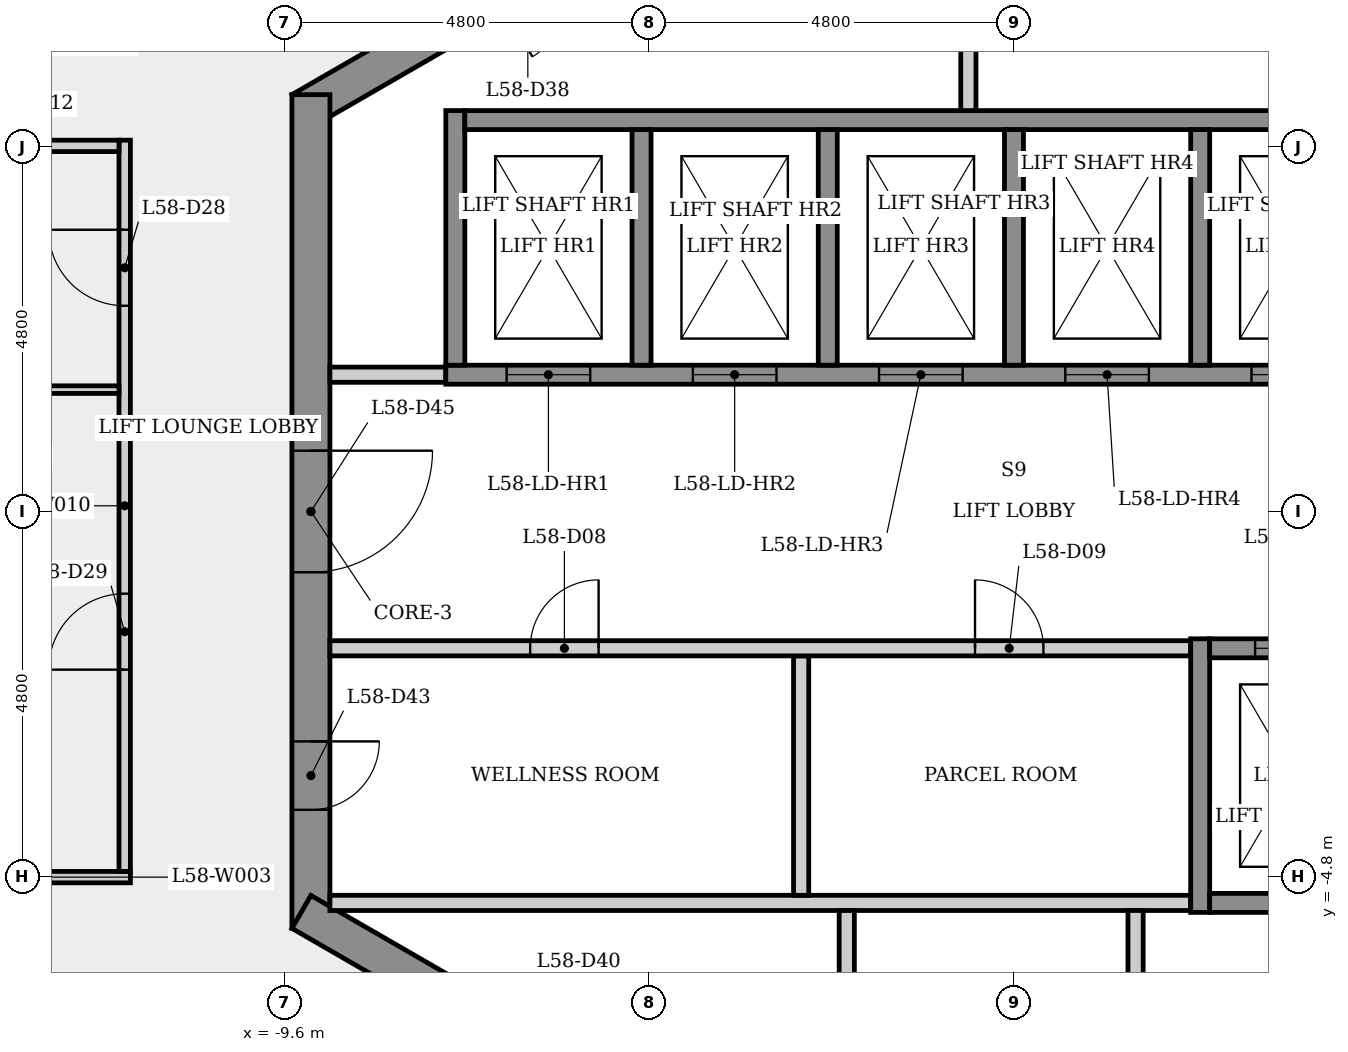
"""IFC4 building model, lengths in metres.
Left out: names, types, materials, properties, quantities, classifications, styles, units other than length and angle.
Written with IfcOpenShell. Run it as: python <this file> out.ifc"""

import sys

from ifc_helpers import new_model, si_unit, direction, frame, frame_2d, origin, place, context, subcontext, project, spatial, rectangle, extrude, element, fill, save


model = new_model("IFC4")
c1 = context("Model", 3, precision=1e-05, world=origin(), true_north=direction((0.0, 1.0)))
c2 = subcontext(c1, "Body", "Model", "MODEL_VIEW")
j1 = project(units=[si_unit("LENGTHUNIT", "METRE"), si_unit("PLANEANGLEUNIT", "RADIAN")], contexts=[c1])
p1 = place(None, origin())
s1 = spatial("IfcSite", under=j1, at=p1, CompositionType="ELEMENT")
p2 = place(p1, origin())
s2 = spatial("IfcBuilding", under=s1, at=p2, CompositionType="ELEMENT")
p3 = place(p2, frame((0.0, 0.0, 218.9)))
s3 = spatial("IfcBuildingStorey", under=s2, at=p3, CompositionType="ELEMENT", Elevation=218.9)
p4 = place(p3, frame((9.375, 5.268, 0.0), z_axis=(0.0, 0.0, 1.0), x_axis=(-0.866023993627, 0.500002442456, 0.0)))
e1 = element("IfcWall", 1, at=p4, inside=s3, PredefinedType="SHEAR", context=c2, shape_type="SweptSolid", body=[
    extrude(rectangle(XDim=10.97, YDim=0.5, at=frame_2d((5.485, 0.0))), origin(), (0.0, 0.0, 1.0), 3.4),
])
p5 = place(p4, frame((5.382, 0.0, 0.0)))
e2 = element("IfcOpeningElement", 2, at=p5, cuts=e1, PredefinedType="OPENING", context=c2, shape_type="SweptSolid", body=[
    extrude(rectangle(XDim=0.9, YDim=2.1, at=frame_2d((0.45, 1.05))), frame((0.0, 0.26, 0.0), z_axis=(0.0, -1.0, 0.0), x_axis=(1.0, 0.0, 0.0)), (0.0, 0.0, 1.0), 0.52),
])
p6 = place(p3, frame((0.125, 10.753, 0.0), z_axis=(0.0, 0.0, 1.0), x_axis=(-0.866023993627, -0.500002442456, 0.0)))
e3 = element("IfcWall", 3, at=p6, inside=s3, PredefinedType="SHEAR", context=c2, shape_type="SweptSolid", body=[
    extrude(rectangle(XDim=10.97, YDim=0.5, at=frame_2d((5.485, 0.0))), origin(), (0.0, 0.0, 1.0), 3.4),
])
p7 = place(p6, frame((7.08, 0.0, 0.0)))
e4 = element("IfcOpeningElement", 4, at=p7, cuts=e3, PredefinedType="OPENING", context=c2, shape_type="SweptSolid", body=[
    extrude(rectangle(XDim=0.9, YDim=2.1, at=frame_2d((0.45, 1.05))), frame((0.0, 0.26, 0.0), z_axis=(0.0, -1.0, 0.0), x_axis=(1.0, 0.0, 0.0)), (0.0, 0.0, 1.0), 0.52),
])
p8 = place(p3, frame((-9.25, 5.485, 0.0), z_axis=(0.0, 0.0, 1.0), x_axis=(0.0, -1.0, 0.0)))
e5 = element("IfcWall", 5, at=p8, inside=s3, PredefinedType="SHEAR", context=c2, shape_type="SweptSolid", body=[
    extrude(rectangle(XDim=10.97, YDim=0.5, at=frame_2d((5.485, 0.0))), origin(), (0.0, 0.0, 1.0), 3.4),
])
p9 = place(p8, frame((8.51, 0.0, 0.0)))
e6 = element("IfcOpeningElement", 6, at=p9, cuts=e5, PredefinedType="OPENING", context=c2, shape_type="SweptSolid", body=[
    extrude(rectangle(XDim=0.9, YDim=2.1, at=frame_2d((0.45, 1.05))), frame((0.0, 0.26, 0.0), z_axis=(0.0, -1.0, 0.0), x_axis=(1.0, 0.0, 0.0)), (0.0, 0.0, 1.0), 0.52),
])
p10 = place(p8, frame((4.685, 0.0, 0.0)))
e7 = element("IfcOpeningElement", 7, at=p10, cuts=e5, PredefinedType="OPENING", context=c2, shape_type="SweptSolid", body=[
    extrude(rectangle(XDim=1.6, YDim=2.1, at=frame_2d((0.8, 1.05))), frame((0.0, 0.26, 0.0), z_axis=(0.0, -1.0, 0.0), x_axis=(1.0, 0.0, 0.0)), (0.0, 0.0, 1.0), 0.52),
])
p11 = place(p3, frame((-9.375, -5.268, 0.0), z_axis=(0.0, 0.0, 1.0), x_axis=(0.866023993627, -0.500002442456, 0.0)))
e8 = element("IfcWall", 8, at=p11, inside=s3, PredefinedType="SHEAR", context=c2, shape_type="SweptSolid", body=[
    extrude(rectangle(XDim=10.97, YDim=0.5, at=frame_2d((5.485, 0.0))), origin(), (0.0, 0.0, 1.0), 3.4),
])
p12 = place(p11, frame((3.765, 0.0, 0.0)))
e9 = element("IfcOpeningElement", 9, at=p12, cuts=e8, PredefinedType="OPENING", context=c2, shape_type="SweptSolid", body=[
    extrude(rectangle(XDim=0.9, YDim=2.1, at=frame_2d((0.45, 1.05))), frame((0.0, 0.26, 0.0), z_axis=(0.0, -1.0, 0.0), x_axis=(1.0, 0.0, 0.0)), (0.0, 0.0, 1.0), 0.52),
])
p13 = place(p11, frame((8.96, 0.0, 0.0)))
e10 = element("IfcOpeningElement", 10, at=p13, cuts=e8, PredefinedType="OPENING", context=c2, shape_type="SweptSolid", body=[
    extrude(rectangle(XDim=0.9, YDim=2.1, at=frame_2d((0.45, 1.05))), frame((0.0, 0.26, 0.0), z_axis=(0.0, -1.0, 0.0), x_axis=(1.0, 0.0, 0.0)), (0.0, 0.0, 1.0), 0.52),
])
p14 = place(p3, frame((-0.125, -10.753, 0.0), z_axis=(0.0, 0.0, 1.0), x_axis=(0.866023993627, 0.500002442456, 0.0)))
e11 = element("IfcWall", 11, at=p14, inside=s3, PredefinedType="SHEAR", context=c2, shape_type="SweptSolid", body=[
    extrude(rectangle(XDim=10.97, YDim=0.5, at=frame_2d((5.485, 0.0))), origin(), (0.0, 0.0, 1.0), 3.4),
])
p15 = place(p14, frame((7.657, 0.0, 0.0)))
e12 = element("IfcOpeningElement", 12, at=p15, cuts=e11, PredefinedType="OPENING", context=c2, shape_type="SweptSolid", body=[
    extrude(rectangle(XDim=0.9, YDim=2.1, at=frame_2d((0.45, 1.05))), frame((0.0, 0.26, 0.0), z_axis=(0.0, -1.0, 0.0), x_axis=(1.0, 0.0, 0.0)), (0.0, 0.0, 1.0), 0.52),
])
p16 = place(p3, frame((-14.391, 4.746, 0.0), z_axis=(0.0, 0.0, 1.0), x_axis=(0.500023814363, 0.866011654119, 0.0)))
e13 = element("IfcWall", 13, at=p16, inside=s3, PredefinedType="PARTITIONING", context=c2, shape_type="SweptSolid", body=[
    extrude(rectangle(XDim=6.171, YDim=0.15, at=frame_2d((3.085, 0.0))), origin(), (0.0, 0.0, 1.0), 3.05),
])
p17 = place(p16, frame((2.585, 0.0, 0.0)))
e14 = element("IfcOpeningElement", 14, at=p17, cuts=e13, PredefinedType="OPENING", context=c2, shape_type="SweptSolid", body=[
    extrude(rectangle(XDim=1.0, YDim=2.1, at=frame_2d((0.5, 1.05))), frame((0.0, 0.085, 0.0), z_axis=(0.0, -1.0, 0.0), x_axis=(1.0, 0.0, 0.0)), (0.0, 0.0, 1.0), 0.17),
])
p18 = place(p3, frame((-14.428, -4.811, 0.0), z_axis=(0.0, 0.0, 1.0), x_axis=(1.0, 0.0, 0.0)))
e15 = element("IfcWall", 15, at=p18, inside=s3, PredefinedType="PARTITIONING", context=c2, shape_type="SweptSolid", body=[
    extrude(rectangle(XDim=2.803, YDim=0.15, at=frame_2d((1.402, 0.0))), origin(), (0.0, 0.0, 1.0), 3.05),
])
p19 = place(p3, frame((-11.7, -4.736, 0.0), z_axis=(0.0, 0.0, 1.0), x_axis=(0.0, 1.0, 0.0)))
e16 = element("IfcWall", 16, at=p19, inside=s3, PredefinedType="PARTITIONING", context=c2, shape_type="SweptSolid", body=[
    extrude(rectangle(XDim=9.622, YDim=0.15, at=frame_2d((4.811, 0.0))), origin(), (0.0, 0.0, 1.0), 3.05),
])
p20 = place(p19, frame((7.443, 0.0, 0.0)))
e17 = element("IfcOpeningElement", 17, at=p20, cuts=e16, PredefinedType="OPENING", context=c2, shape_type="SweptSolid", body=[
    extrude(rectangle(XDim=1.0, YDim=2.1, at=frame_2d((0.5, 1.05))), frame((0.0, 0.085, 0.0), z_axis=(0.0, -1.0, 0.0), x_axis=(1.0, 0.0, 0.0)), (0.0, 0.0, 1.0), 0.17),
])
p21 = place(p19, frame((2.655, 0.0, 0.0)))
e18 = element("IfcOpeningElement", 18, at=p21, cuts=e16, PredefinedType="OPENING", context=c2, shape_type="SweptSolid", body=[
    extrude(rectangle(XDim=1.0, YDim=2.1, at=frame_2d((0.5, 1.05))), frame((0.0, 0.085, 0.0), z_axis=(0.0, -1.0, 0.0), x_axis=(1.0, 0.0, 0.0)), (0.0, 0.0, 1.0), 0.17),
])
p22 = place(p3, frame((-11.775, 1.604, 0.0), z_axis=(0.0, 0.0, 1.0), x_axis=(-1.0, 0.0, 0.0)))
e19 = element("IfcWall", 19, at=p22, inside=s3, PredefinedType="PARTITIONING", context=c2, shape_type="SweptSolid", body=[
    extrude(rectangle(XDim=5.113, YDim=0.1, at=frame_2d((2.556, 0.0))), origin(), (0.0, 0.0, 1.0), 3.05),
])
p23 = place(p3, frame((-11.775, 4.811, 0.0), z_axis=(0.0, 0.0, 1.0), x_axis=(-1.0, 0.0, 0.0)))
e20 = element("IfcWall", 20, at=p23, inside=s3, PredefinedType="PARTITIONING", context=c2, shape_type="SweptSolid", body=[
    extrude(rectangle(XDim=2.504, YDim=0.15, at=frame_2d((1.252, 0.0))), origin(), (0.0, 0.0, 1.0), 3.05),
])
p24 = place(p3, frame((-9.0, 1.8, 0.0), z_axis=(0.0, 0.0, 1.0), x_axis=(1.0, 0.0, 0.0)))
e21 = element("IfcWall", 21, at=p24, inside=s3, PredefinedType="PARTITIONING", context=c2, shape_type="SweptSolid", body=[
    extrude(rectangle(XDim=1.525, YDim=0.2, at=frame_2d((0.763, 0.0))), origin(), (0.0, 0.0, 1.0), 3.05),
])
p25 = place(p3, frame((-9.0, -5.15, 0.0), z_axis=(0.0, 0.0, 1.0), x_axis=(1.0, 0.0, 0.0)))
e22 = element("IfcWall", 22, at=p25, inside=s3, PredefinedType="PARTITIONING", context=c2, shape_type="SweptSolid", body=[
    extrude(rectangle(XDim=11.325, YDim=0.2, at=frame_2d((5.663, 0.0))), origin(), (0.0, 0.0, 1.0), 3.05),
])
p26 = place(p3, frame((-7.475, 1.8, 0.0), z_axis=(0.0, 0.0, 1.0), x_axis=(1.0, 0.0, 0.0)))
e23 = element("IfcWall", 23, at=p26, inside=s3, PredefinedType="SHEAR", context=c2, shape_type="SweptSolid", body=[
    extrude(rectangle(XDim=14.95, YDim=0.25, at=frame_2d((7.475, 0.0))), origin(), (0.0, 0.0, 1.0), 3.05),
])
p27 = place(p26, frame((0.8, 0.0, 0.0)))
e24 = element("IfcOpeningElement", 24, at=p27, cuts=e23, PredefinedType="OPENING", context=c2, shape_type="SweptSolid", body=[
    extrude(rectangle(XDim=1.1, YDim=2.1, at=frame_2d((0.55, 1.05))), frame((0.0, 0.135, 0.0), z_axis=(0.0, -1.0, 0.0), x_axis=(1.0, 0.0, 0.0)), (0.0, 0.0, 1.0), 0.27),
])
p28 = place(p26, frame((3.25, 0.0, 0.0)))
e25 = element("IfcOpeningElement", 25, at=p28, cuts=e23, PredefinedType="OPENING", context=c2, shape_type="SweptSolid", body=[
    extrude(rectangle(XDim=1.1, YDim=2.1, at=frame_2d((0.55, 1.05))), frame((0.0, 0.135, 0.0), z_axis=(0.0, -1.0, 0.0), x_axis=(1.0, 0.0, 0.0)), (0.0, 0.0, 1.0), 0.27),
])
p29 = place(p26, frame((5.7, 0.0, 0.0)))
e26 = element("IfcOpeningElement", 26, at=p29, cuts=e23, PredefinedType="OPENING", context=c2, shape_type="SweptSolid", body=[
    extrude(rectangle(XDim=1.1, YDim=2.1, at=frame_2d((0.55, 1.05))), frame((0.0, 0.135, 0.0), z_axis=(0.0, -1.0, 0.0), x_axis=(1.0, 0.0, 0.0)), (0.0, 0.0, 1.0), 0.27),
])
p30 = place(p26, frame((8.15, 0.0, 0.0)))
e27 = element("IfcOpeningElement", 27, at=p30, cuts=e23, PredefinedType="OPENING", context=c2, shape_type="SweptSolid", body=[
    extrude(rectangle(XDim=1.1, YDim=2.1, at=frame_2d((0.55, 1.05))), frame((0.0, 0.135, 0.0), z_axis=(0.0, -1.0, 0.0), x_axis=(1.0, 0.0, 0.0)), (0.0, 0.0, 1.0), 0.27),
])
p31 = place(p26, frame((10.6, 0.0, 0.0)))
e28 = element("IfcOpeningElement", 28, at=p31, cuts=e23, PredefinedType="OPENING", context=c2, shape_type="SweptSolid", body=[
    extrude(rectangle(XDim=1.1, YDim=2.1, at=frame_2d((0.55, 1.05))), frame((0.0, 0.135, 0.0), z_axis=(0.0, -1.0, 0.0), x_axis=(1.0, 0.0, 0.0)), (0.0, 0.0, 1.0), 0.27),
])
p32 = place(p26, frame((13.05, 0.0, 0.0)))
e29 = element("IfcOpeningElement", 29, at=p32, cuts=e23, PredefinedType="OPENING", context=c2, shape_type="SweptSolid", body=[
    extrude(rectangle(XDim=1.1, YDim=2.1, at=frame_2d((0.55, 1.05))), frame((0.0, 0.135, 0.0), z_axis=(0.0, -1.0, 0.0), x_axis=(1.0, 0.0, 0.0)), (0.0, 0.0, 1.0), 0.27),
])
p33 = place(p3, frame((-7.35, 1.925, 0.0), z_axis=(0.0, 0.0, 1.0), x_axis=(0.0, 1.0, 0.0)))
e30 = element("IfcWall", 30, at=p33, inside=s3, PredefinedType="SHEAR", context=c2, shape_type="SweptSolid", body=[
    extrude(rectangle(XDim=3.35, YDim=0.25, at=frame_2d((1.675, 0.0))), origin(), (0.0, 0.0, 1.0), 3.05),
])
p34 = place(p3, frame((-7.225, 5.15, 0.0), z_axis=(0.0, 0.0, 1.0), x_axis=(1.0, 0.0, 0.0)))
e31 = element("IfcWall", 31, at=p34, inside=s3, PredefinedType="SHEAR", context=c2, shape_type="SweptSolid", body=[
    extrude(rectangle(XDim=14.7, YDim=0.25, at=frame_2d((7.35, 0.0))), origin(), (0.0, 0.0, 1.0), 3.05),
])
p35 = place(p3, frame((-4.9, 5.025, 0.0), z_axis=(0.0, 0.0, 1.0), x_axis=(0.0, -1.0, 0.0)))
e32 = element("IfcWall", 32, at=p35, inside=s3, PredefinedType="SHEAR", context=c2, shape_type="SweptSolid", body=[
    extrude(rectangle(XDim=3.1, YDim=0.25, at=frame_2d((1.55, 0.0))), origin(), (0.0, 0.0, 1.0), 3.4),
])
p36 = place(p3, frame((-2.8, -1.9, 0.0), z_axis=(0.0, 0.0, 1.0), x_axis=(0.0, -1.0, 0.0)))
e33 = element("IfcWall", 33, at=p36, inside=s3, PredefinedType="PARTITIONING", context=c2, shape_type="SweptSolid", body=[
    extrude(rectangle(XDim=3.15, YDim=0.2, at=frame_2d((1.575, 0.0))), origin(), (0.0, 0.0, 1.0), 3.05),
])
p37 = place(p3, frame((-9.0, -1.8, 0.0), z_axis=(0.0, 0.0, 1.0), x_axis=(1.0, 0.0, 0.0)))
e34 = element("IfcWall", 34, at=p37, inside=s3, PredefinedType="PARTITIONING", context=c2, shape_type="SweptSolid", body=[
    extrude(rectangle(XDim=11.325, YDim=0.2, at=frame_2d((5.663, 0.0))), origin(), (0.0, 0.0, 1.0), 3.05),
])
p38 = place(p37, frame((2.635, 0.0, 0.0)))
e35 = element("IfcOpeningElement", 35, at=p38, cuts=e34, PredefinedType="OPENING", context=c2, shape_type="SweptSolid", body=[
    extrude(rectangle(XDim=0.9, YDim=2.1, at=frame_2d((0.45, 1.05))), frame((0.0, 0.11, 0.0), z_axis=(0.0, -1.0, 0.0), x_axis=(1.0, 0.0, 0.0)), (0.0, 0.0, 1.0), 0.22),
])
p39 = place(p37, frame((8.488, 0.0, 0.0)))
e36 = element("IfcOpeningElement", 36, at=p39, cuts=e34, PredefinedType="OPENING", context=c2, shape_type="SweptSolid", body=[
    extrude(rectangle(XDim=0.9, YDim=2.1, at=frame_2d((0.45, 1.05))), frame((0.0, 0.11, 0.0), z_axis=(0.0, -1.0, 0.0), x_axis=(1.0, 0.0, 0.0)), (0.0, 0.0, 1.0), 0.22),
])
p40 = place(p3, frame((-2.45, 5.025, 0.0), z_axis=(0.0, 0.0, 1.0), x_axis=(0.0, -1.0, 0.0)))
e37 = element("IfcWall", 37, at=p40, inside=s3, PredefinedType="SHEAR", context=c2, shape_type="SweptSolid", body=[
    extrude(rectangle(XDim=3.1, YDim=0.25, at=frame_2d((1.55, 0.0))), origin(), (0.0, 0.0, 1.0), 3.4),
])
p41 = place(p3, frame((-2.2, -5.25, 0.0), z_axis=(0.0, 0.0, 1.0), x_axis=(0.0, -1.0, 0.0)))
e38 = element("IfcWall", 38, at=p41, inside=s3, PredefinedType="PARTITIONING", context=c2, shape_type="SweptSolid", body=[
    extrude(rectangle(XDim=3.872, YDim=0.2, at=frame_2d((1.936, 0.0))), origin(), (0.0, 0.0, 1.0), 3.05),
])
p42 = place(p3, frame((-0.6, 10.046, 0.0), z_axis=(0.0, 0.0, 1.0), x_axis=(0.0, -1.0, 0.0)))
e39 = element("IfcWall", 39, at=p42, inside=s3, PredefinedType="PARTITIONING", context=c2, shape_type="SweptSolid", body=[
    extrude(rectangle(XDim=4.771, YDim=0.2, at=frame_2d((2.385, 0.0))), origin(), (0.0, 0.0, 1.0), 3.05),
])
p43 = place(p3, frame((0.0, 5.025, 0.0), z_axis=(0.0, 0.0, 1.0), x_axis=(0.0, -1.0, 0.0)))
e40 = element("IfcWall", 40, at=p43, inside=s3, PredefinedType="SHEAR", context=c2, shape_type="SweptSolid", body=[
    extrude(rectangle(XDim=3.1, YDim=0.25, at=frame_2d((1.55, 0.0))), origin(), (0.0, 0.0, 1.0), 3.4),
])
p44 = place(p3, frame((1.6, -5.25, 0.0), z_axis=(0.0, 0.0, 1.0), x_axis=(0.0, -1.0, 0.0)))
e41 = element("IfcWall", 41, at=p44, inside=s3, PredefinedType="PARTITIONING", context=c2, shape_type="SweptSolid", body=[
    extrude(rectangle(XDim=4.219, YDim=0.2, at=frame_2d((2.109, 0.0))), origin(), (0.0, 0.0, 1.0), 3.05),
])
p45 = place(p3, frame((2.45, -5.275, 0.0), z_axis=(0.0, 0.0, 1.0), x_axis=(0.0, 1.0, 0.0)))
e42 = element("IfcWall", 42, at=p45, inside=s3, PredefinedType="SHEAR", context=c2, shape_type="SweptSolid", body=[
    extrude(rectangle(XDim=3.6, YDim=0.25, at=frame_2d((1.8, 0.0))), origin(), (0.0, 0.0, 1.0), 3.05),
])
p46 = place(p3, frame((2.45, 5.025, 0.0), z_axis=(0.0, 0.0, 1.0), x_axis=(0.0, -1.0, 0.0)))
e43 = element("IfcWall", 43, at=p46, inside=s3, PredefinedType="SHEAR", context=c2, shape_type="SweptSolid", body=[
    extrude(rectangle(XDim=3.1, YDim=0.25, at=frame_2d((1.55, 0.0))), origin(), (0.0, 0.0, 1.0), 3.4),
])
p47 = place(p3, frame((2.575, -5.15, 0.0), z_axis=(0.0, 0.0, 1.0), x_axis=(1.0, 0.0, 0.0)))
e44 = element("IfcWall", 44, at=p47, inside=s3, PredefinedType="SHEAR", context=c2, shape_type="SweptSolid", body=[
    extrude(rectangle(XDim=4.9, YDim=0.25, at=frame_2d((2.45, 0.0))), origin(), (0.0, 0.0, 1.0), 3.05),
])
p48 = place(p3, frame((2.575, -1.8, 0.0), z_axis=(0.0, 0.0, 1.0), x_axis=(1.0, 0.0, 0.0)))
e45 = element("IfcWall", 45, at=p48, inside=s3, PredefinedType="SHEAR", context=c2, shape_type="SweptSolid", body=[
    extrude(rectangle(XDim=4.9, YDim=0.25, at=frame_2d((2.45, 0.0))), origin(), (0.0, 0.0, 1.0), 3.05),
])
p49 = place(p48, frame((0.597, 0.0, 0.0)))
e46 = element("IfcOpeningElement", 46, at=p49, cuts=e45, PredefinedType="OPENING", context=c2, shape_type="SweptSolid", body=[
    extrude(rectangle(XDim=1.1, YDim=2.1, at=frame_2d((0.55, 1.05))), frame((0.0, 0.135, 0.0), z_axis=(0.0, -1.0, 0.0), x_axis=(1.0, 0.0, 0.0)), (0.0, 0.0, 1.0), 0.27),
])
p50 = place(p27, origin())
e47 = element("IfcDoor", 47, at=p50, inside=s3, OperationType="SLIDING_TO_LEFT", PredefinedType="DOOR", context=c2, shape_type="SweptSolid", body=[
    extrude(rectangle(XDim=1.1, YDim=2.1, at=frame_2d((0.55, 1.05))), frame((0.0, 0.025, 0.0), z_axis=(0.0, -1.0, 0.0), x_axis=(1.0, 0.0, 0.0)), (0.0, 0.0, 1.0), 0.05),
])
fill(e24, e47)
p51 = place(p28, origin())
e48 = element("IfcDoor", 48, at=p51, inside=s3, OperationType="SLIDING_TO_LEFT", PredefinedType="DOOR", context=c2, shape_type="SweptSolid", body=[
    extrude(rectangle(XDim=1.1, YDim=2.1, at=frame_2d((0.55, 1.05))), frame((0.0, 0.025, 0.0), z_axis=(0.0, -1.0, 0.0), x_axis=(1.0, 0.0, 0.0)), (0.0, 0.0, 1.0), 0.05),
])
fill(e25, e48)
p52 = place(p29, origin())
e49 = element("IfcDoor", 49, at=p52, inside=s3, OperationType="SLIDING_TO_LEFT", PredefinedType="DOOR", context=c2, shape_type="SweptSolid", body=[
    extrude(rectangle(XDim=1.1, YDim=2.1, at=frame_2d((0.55, 1.05))), frame((0.0, 0.025, 0.0), z_axis=(0.0, -1.0, 0.0), x_axis=(1.0, 0.0, 0.0)), (0.0, 0.0, 1.0), 0.05),
])
fill(e26, e49)
p53 = place(p30, origin())
e50 = element("IfcDoor", 50, at=p53, inside=s3, OperationType="SLIDING_TO_LEFT", PredefinedType="DOOR", context=c2, shape_type="SweptSolid", body=[
    extrude(rectangle(XDim=1.1, YDim=2.1, at=frame_2d((0.55, 1.05))), frame((0.0, 0.025, 0.0), z_axis=(0.0, -1.0, 0.0), x_axis=(1.0, 0.0, 0.0)), (0.0, 0.0, 1.0), 0.05),
])
fill(e27, e50)
p54 = place(p31, origin())
e51 = element("IfcDoor", 51, at=p54, inside=s3, OperationType="SLIDING_TO_LEFT", PredefinedType="DOOR", context=c2, shape_type="SweptSolid", body=[
    extrude(rectangle(XDim=1.1, YDim=2.1, at=frame_2d((0.55, 1.05))), frame((0.0, 0.025, 0.0), z_axis=(0.0, -1.0, 0.0), x_axis=(1.0, 0.0, 0.0)), (0.0, 0.0, 1.0), 0.05),
])
fill(e28, e51)
p55 = place(p49, origin())
e52 = element("IfcDoor", 52, at=p55, inside=s3, OperationType="SLIDING_TO_LEFT", PredefinedType="DOOR", context=c2, shape_type="SweptSolid", body=[
    extrude(rectangle(XDim=1.1, YDim=2.1, at=frame_2d((0.55, 1.05))), frame((0.0, 0.025, 0.0), z_axis=(0.0, -1.0, 0.0), x_axis=(1.0, 0.0, 0.0)), (0.0, 0.0, 1.0), 0.05),
])
fill(e46, e52)
p56 = place(p38, origin())
e53 = element("IfcDoor", 53, at=p56, inside=s3, OperationType="SINGLE_SWING_RIGHT", PredefinedType="DOOR", context=c2, shape_type="SweptSolid", body=[
    extrude(rectangle(XDim=0.9, YDim=2.1, at=frame_2d((0.45, 1.05))), frame((0.0, 0.025, 0.0), z_axis=(0.0, -1.0, 0.0), x_axis=(1.0, 0.0, 0.0)), (0.0, 0.0, 1.0), 0.05),
])
fill(e35, e53)
p57 = place(p39, origin())
e54 = element("IfcDoor", 54, at=p57, inside=s3, OperationType="SINGLE_SWING_LEFT", PredefinedType="DOOR", context=c2, shape_type="SweptSolid", body=[
    extrude(rectangle(XDim=0.9, YDim=2.1, at=frame_2d((0.45, 1.05))), frame((0.0, 0.025, 0.0), z_axis=(0.0, -1.0, 0.0), x_axis=(1.0, 0.0, 0.0)), (0.0, 0.0, 1.0), 0.05),
])
fill(e36, e54)
p58 = place(p20, origin())
e55 = element("IfcDoor", 55, at=p58, inside=s3, OperationType="SINGLE_SWING_RIGHT", PredefinedType="DOOR", context=c2, shape_type="SweptSolid", body=[
    extrude(rectangle(XDim=1.0, YDim=2.1, at=frame_2d((0.5, 1.05))), frame((0.0, 0.025, 0.0), z_axis=(0.0, -1.0, 0.0), x_axis=(1.0, 0.0, 0.0)), (0.0, 0.0, 1.0), 0.05),
])
fill(e17, e55)
p59 = place(p21, origin())
e56 = element("IfcDoor", 56, at=p59, inside=s3, OperationType="SINGLE_SWING_LEFT", PredefinedType="DOOR", context=c2, shape_type="SweptSolid", body=[
    extrude(rectangle(XDim=1.0, YDim=2.1, at=frame_2d((0.5, 1.05))), frame((0.0, 0.025, 0.0), z_axis=(0.0, -1.0, 0.0), x_axis=(1.0, 0.0, 0.0)), (0.0, 0.0, 1.0), 0.05),
])
fill(e18, e56)
p60 = place(p9, origin())
e57 = element("IfcDoor", 57, at=p60, inside=s3, OperationType="SINGLE_SWING_LEFT", PredefinedType="DOOR", context=c2, shape_type="SweptSolid", body=[
    extrude(rectangle(XDim=0.9, YDim=2.1, at=frame_2d((0.45, 1.05))), frame((0.0, 0.025, 0.0), z_axis=(0.0, -1.0, 0.0), x_axis=(1.0, 0.0, 0.0)), (0.0, 0.0, 1.0), 0.05),
])
fill(e6, e57)
p61 = place(p10, origin())
e58 = element("IfcDoor", 58, at=p61, inside=s3, OperationType="SINGLE_SWING_LEFT", PredefinedType="DOOR", context=c2, shape_type="SweptSolid", body=[
    extrude(rectangle(XDim=1.6, YDim=2.1, at=frame_2d((0.8, 1.05))), frame((0.0, 0.025, 0.0), z_axis=(0.0, -1.0, 0.0), x_axis=(1.0, 0.0, 0.0)), (0.0, 0.0, 1.0), 0.05),
])
fill(e7, e58)
save(model, sys.argv[1])
